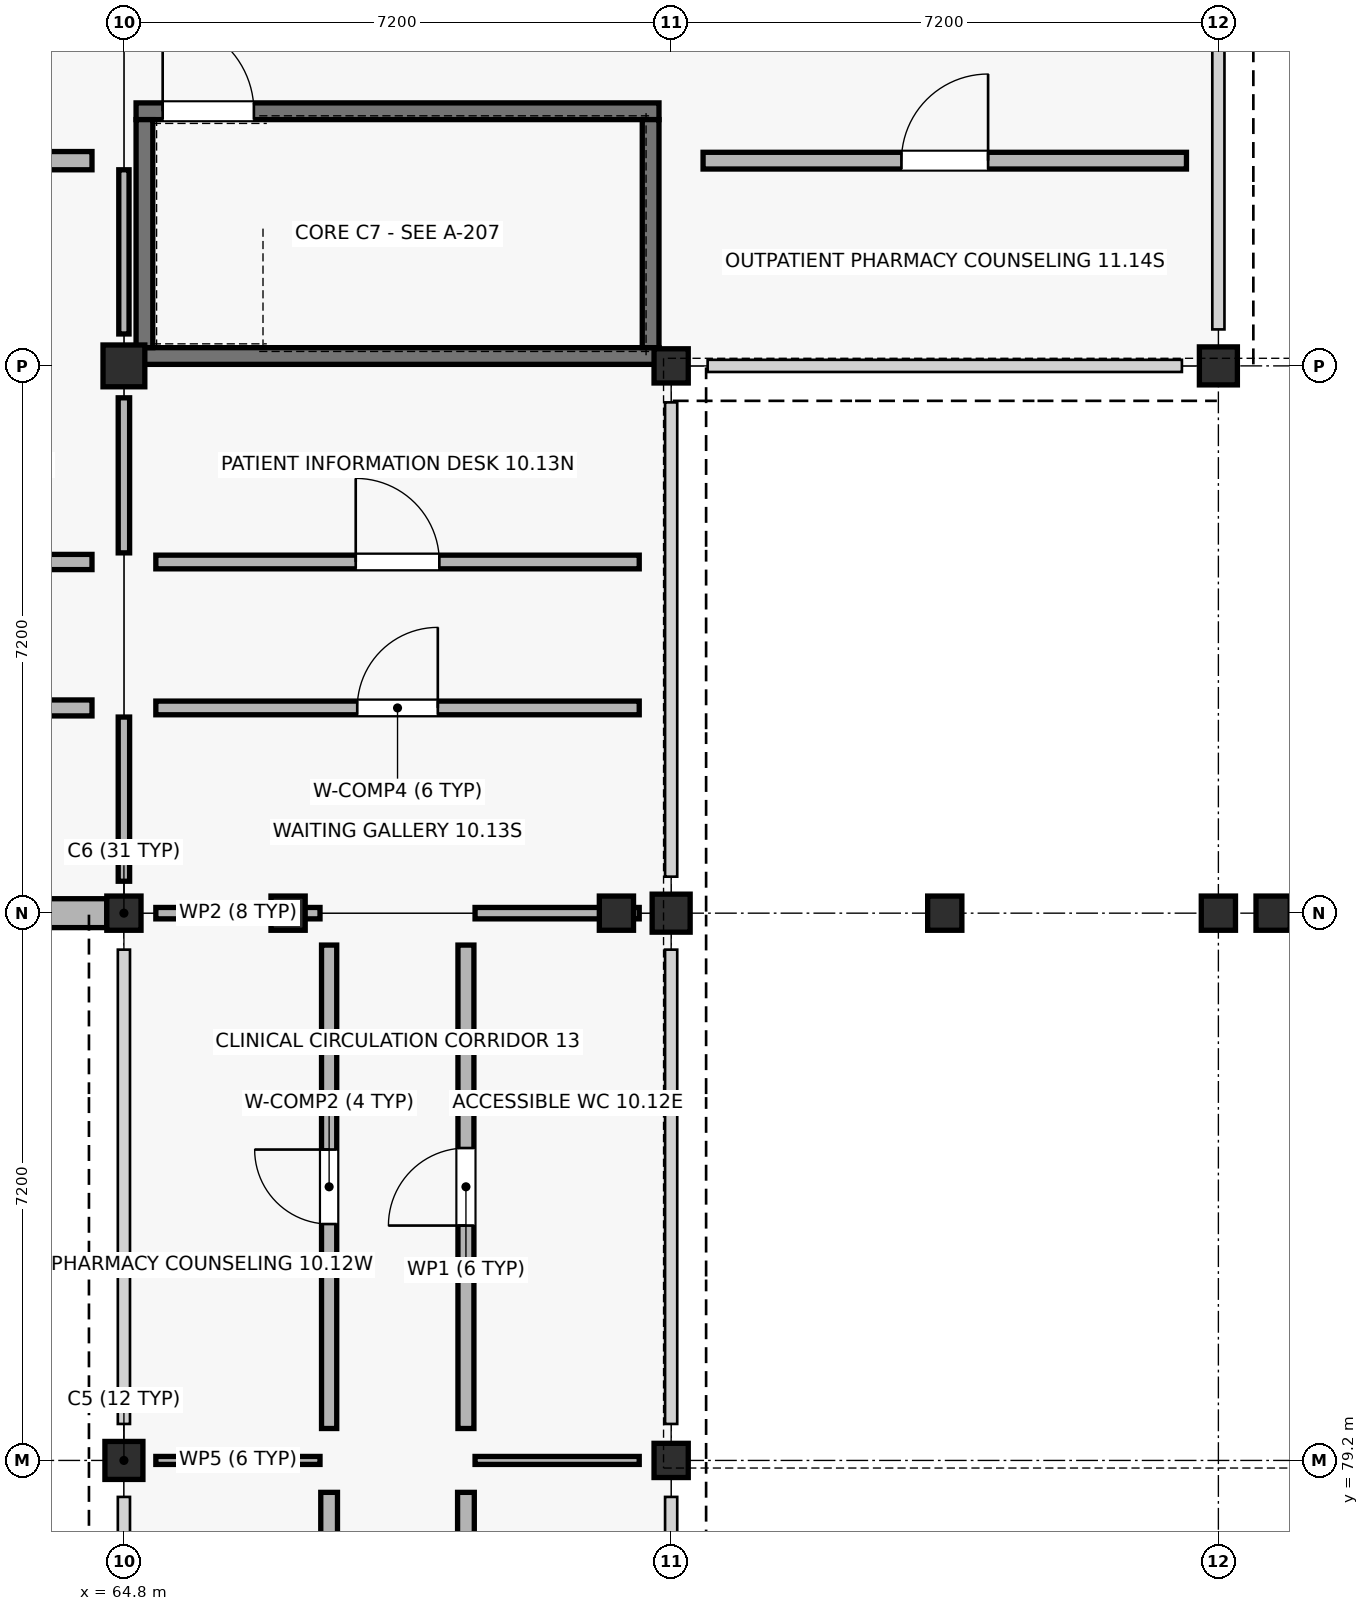
"""IFC4 building model, lengths in metres.
Left out: names, types, materials, properties, quantities, classifications, styles, units other than length and angle.
Written with IfcOpenShell. Run it as: python <this file> out.ifc"""

import sys

from ifc_helpers import new_model, si_unit, direction, frame, frame_2d, origin, origin_2d, place, context, subcontext, project, spatial, rectangle, extrude, element, fill, save


model = new_model("IFC4")
c1 = context("Model", 3, precision=1e-05, world=origin(), true_north=direction((0.0, 1.0)))
c2 = subcontext(c1, "Body", "Model", "MODEL_VIEW")
j1 = project(units=[si_unit("LENGTHUNIT", "METRE"), si_unit("PLANEANGLEUNIT", "RADIAN")], contexts=[c1])
p1 = place(None, origin())
s1 = spatial("IfcSite", under=j1, at=p1, CompositionType="ELEMENT")
p2 = place(p1, origin())
s2 = spatial("IfcBuilding", under=s1, at=p2, CompositionType="ELEMENT")
p3 = place(p2, frame((0.0, 0.0, 4.5)))
s3 = spatial("IfcBuildingStorey", under=s2, at=p3, CompositionType="ELEMENT", Elevation=4.5)
p4 = place(p3, frame((64.8, 79.2, 0.0), z_axis=(0.0, 0.0, 1.0), x_axis=(1.0, 0.0, 0.0)))
e1 = element("IfcColumn", 1, at=p4, inside=s3, PredefinedType="COLUMN", context=c2, shape_type="SweptSolid", body=[
    extrude(rectangle(XDim=0.5, YDim=0.5, at=origin_2d()), origin(), (0.0, 0.0, 1.0), 4.28),
])
p5 = place(p3, frame((64.8, 86.4, 0.0), z_axis=(0.0, 0.0, 1.0), x_axis=(1.0, 0.0, 0.0)))
e2 = element("IfcColumn", 2, at=p5, inside=s3, PredefinedType="COLUMN", context=c2, shape_type="SweptSolid", body=[
    extrude(rectangle(XDim=0.45, YDim=0.45, at=origin_2d()), origin(), (0.0, 0.0, 1.0), 12.72),
])
p6 = place(p3, frame((64.8, 93.6, 0.0), z_axis=(0.0, 0.0, 1.0), x_axis=(1.0, 0.0, 0.0)))
e3 = element("IfcColumn", 3, at=p6, inside=s3, PredefinedType="COLUMN", context=c2, shape_type="SweptSolid", body=[
    extrude(rectangle(XDim=0.55, YDim=0.55, at=origin_2d()), origin(), (0.0, 0.0, 1.0), 4.5),
])
p7 = place(p3, frame((72.0, 79.2, 0.0), z_axis=(0.0, 0.0, 1.0), x_axis=(1.0, 0.0, 0.0)))
e4 = element("IfcColumn", 4, at=p7, inside=s3, PredefinedType="COLUMN", context=c2, shape_type="SweptSolid", body=[
    extrude(rectangle(XDim=0.45, YDim=0.45, at=origin_2d()), origin(), (0.0, 0.0, 1.0), 4.28),
])
p8 = place(p3, frame((72.0, 86.4, 0.0), z_axis=(0.0, 0.0, 1.0), x_axis=(1.0, 0.0, 0.0)))
e5 = element("IfcColumn", 5, at=p8, inside=s3, PredefinedType="COLUMN", context=c2, shape_type="SweptSolid", body=[
    extrude(rectangle(XDim=0.5, YDim=0.5, at=origin_2d()), origin(), (0.0, 0.0, 1.0), 12.72),
])
p9 = place(p3, frame((72.0, 93.6, 0.0), z_axis=(0.0, 0.0, 1.0), x_axis=(1.0, 0.0, 0.0)))
e6 = element("IfcColumn", 6, at=p9, inside=s3, PredefinedType="COLUMN", context=c2, shape_type="SweptSolid", body=[
    extrude(rectangle(XDim=0.45, YDim=0.45, at=origin_2d()), origin(), (0.0, 0.0, 1.0), 4.28),
])
p10 = place(p3, frame((79.2, 86.4, 0.0), z_axis=(0.0, 0.0, 1.0), x_axis=(1.0, 0.0, 0.0)))
e7 = element("IfcColumn", 7, at=p10, inside=s3, PredefinedType="COLUMN", context=c2, shape_type="SweptSolid", body=[
    extrude(rectangle(XDim=0.45, YDim=0.45, at=origin_2d()), origin(), (0.0, 0.0, 1.0), 12.72),
])
p11 = place(p3, frame((79.2, 93.6, 0.0), z_axis=(0.0, 0.0, 1.0), x_axis=(1.0, 0.0, 0.0)))
e8 = element("IfcColumn", 8, at=p11, inside=s3, PredefinedType="COLUMN", context=c2, shape_type="SweptSolid", body=[
    extrude(rectangle(XDim=0.5, YDim=0.5, at=origin_2d()), origin(), (0.0, 0.0, 1.0), 4.28),
])
for number, where, z_axis, x_axis in (
    (9, (66.96, 86.4, 12.295), (0.0, 0.0, 1.0), (1.0, 0.0, 0.0)),
    (10, (71.28, 86.4, 12.295), (0.0, 0.0, 1.0), (1.0, 0.0, 0.0)),
    (11, (75.6, 86.4, 12.295), (0.0, 0.0, 1.0), (1.0, 0.0, 0.0)),
    (12, (79.92, 86.4, 12.295), (0.0, 0.0, 1.0), (1.0, 0.0, 0.0)),
):
    element("IfcColumn", number, at=place(p3, frame(where, z_axis=z_axis, x_axis=x_axis)), inside=s3, PredefinedType="COLUMN", context=c2, shape_type="SweptSolid", body=[
        extrude(rectangle(XDim=0.45, YDim=0.45, at=origin_2d()), origin(), (0.0, 0.0, 1.0), 3.405),
    ])
p12 = place(p3, frame((57.875, 86.4, 0.0), z_axis=(0.0, 0.0, 1.0), x_axis=(1.0, 0.0, 0.0)))
e13 = element("IfcWall", 13, at=p12, inside=s3, PredefinedType="SOLIDWALL", context=c2, shape_type="SweptSolid", body=[
    extrude(rectangle(XDim=6.7, YDim=0.38, at=frame_2d((3.35, 0.0))), origin(), (0.0, 0.0, 1.0), 3.47),
])
p13 = place(p12, frame((1.15, 0.0, 0.9)))
e14 = element("IfcOpeningElement", 14, at=p13, cuts=e13, PredefinedType="OPENING", context=c2, shape_type="SweptSolid", body=[
    extrude(rectangle(XDim=1.2, YDim=1.62, at=frame_2d((0.6, 0.81))), frame((0.0, 0.2, 0.0), z_axis=(0.0, -1.0, 0.0), x_axis=(1.0, 0.0, 0.0)), (0.0, 0.0, 1.0), 0.4),
])
p14 = place(p12, frame((4.35, 0.0, 0.9)))
e15 = element("IfcOpeningElement", 15, at=p14, cuts=e13, PredefinedType="OPENING", context=c2, shape_type="SweptSolid", body=[
    extrude(rectangle(XDim=1.2, YDim=1.62, at=frame_2d((0.6, 0.81))), frame((0.0, 0.2, 0.0), z_axis=(0.0, -1.0, 0.0), x_axis=(1.0, 0.0, 0.0)), (0.0, 0.0, 1.0), 0.4),
])
p15 = place(p3, frame((64.96, 93.73, 0.0), z_axis=(0.0, 0.0, 1.0), x_axis=(1.0, 0.0, 0.0)))
e16 = element("IfcWall", 16, at=p15, inside=s3, PredefinedType="SHEAR", context=c2, shape_type="SweptSolid", body=[
    extrude(rectangle(XDim=6.88, YDim=0.22, at=frame_2d((3.44, 0.0))), origin(), (0.0, 0.0, 1.0), 4.22),
])
p16 = place(p3, frame((64.96, 96.95, 0.0), z_axis=(0.0, 0.0, 1.0), x_axis=(1.0, 0.0, 0.0)))
e17 = element("IfcWall", 17, at=p16, inside=s3, PredefinedType="SHEAR", context=c2, shape_type="SweptSolid", body=[
    extrude(rectangle(XDim=6.88, YDim=0.22, at=frame_2d((3.44, 0.0))), origin(), (0.0, 0.0, 1.0), 4.22),
])
p17 = place(p16, frame((0.35, 0.0, 0.0)))
e18 = element("IfcOpeningElement", 18, at=p17, cuts=e17, PredefinedType="OPENING", context=c2, shape_type="SweptSolid", body=[
    extrude(rectangle(XDim=1.2, YDim=2.15, at=frame_2d((0.6, 1.075))), frame((0.0, 0.12, 0.0), z_axis=(0.0, -1.0, 0.0), x_axis=(1.0, 0.0, 0.0)), (0.0, 0.0, 1.0), 0.24),
])
for number, where, z_axis, x_axis in (
    (19, (65.07, 93.84, 0.0), (0.0, 0.0, 1.0), (0.0, 1.0, 0.0)),
    (20, (71.73, 93.84, 0.0), (0.0, 0.0, 1.0), (0.0, 1.0, 0.0)),
):
    element("IfcWall", number, at=place(p3, frame(where, z_axis=z_axis, x_axis=x_axis)), inside=s3, PredefinedType="SHEAR", context=c2, shape_type="SweptSolid", body=[
        extrude(rectangle(XDim=3.0, YDim=0.22, at=frame_2d((1.5, 0.0))), origin(), (0.0, 0.0, 1.0), 4.22),
    ])
p18 = place(p3, frame((67.5, 72.42, 0.0), z_axis=(0.0, 0.0, 1.0), x_axis=(0.0, 1.0, 0.0)))
e21 = element("IfcWall", 21, at=p18, inside=s3, PredefinedType="SOLIDWALL", context=c2, shape_type="SweptSolid", body=[
    extrude(rectangle(XDim=6.36, YDim=0.22, at=frame_2d((3.18, 0.0))), origin(), (0.0, 0.0, 1.0), 3.36),
])
p19 = place(p18, frame((2.73, 0.0, 0.0)))
e22 = element("IfcOpeningElement", 22, at=p19, cuts=e21, PredefinedType="OPENING", context=c2, shape_type="SweptSolid", body=[
    extrude(rectangle(XDim=0.9, YDim=2.14, at=frame_2d((0.45, 1.07))), frame((0.0, 0.12, 0.0), z_axis=(0.0, -1.0, 0.0), x_axis=(1.0, 0.0, 0.0)), (0.0, 0.0, 1.0), 0.24),
])
p20 = place(p3, frame((65.22, 79.2, 0.0), z_axis=(0.0, 0.0, 1.0), x_axis=(1.0, 0.0, 0.0)))
e23 = element("IfcWall", 23, at=p20, inside=s3, PredefinedType="PARTITIONING", context=c2, shape_type="SweptSolid", body=[
    extrude(rectangle(XDim=2.16, YDim=0.105, at=frame_2d((1.08, 0.0))), origin(), (0.0, 0.0, 1.0), 3.36),
])
p21 = place(p3, frame((69.3, 72.42, 0.0), z_axis=(0.0, 0.0, 1.0), x_axis=(0.0, 1.0, 0.0)))
e24 = element("IfcWall", 24, at=p21, inside=s3, PredefinedType="SOLIDWALL", context=c2, shape_type="SweptSolid", body=[
    extrude(rectangle(XDim=6.36, YDim=0.22, at=frame_2d((3.18, 0.0))), origin(), (0.0, 0.0, 1.0), 3.36),
])
p22 = place(p21, frame((2.71, 0.0, 0.0)))
e25 = element("IfcOpeningElement", 25, at=p22, cuts=e24, PredefinedType="OPENING", context=c2, shape_type="SweptSolid", body=[
    extrude(rectangle(XDim=0.94, YDim=2.14, at=frame_2d((0.47, 1.07))), frame((0.0, 0.12, 0.0), z_axis=(0.0, -1.0, 0.0), x_axis=(1.0, 0.0, 0.0)), (0.0, 0.0, 1.0), 0.24),
])
p23 = place(p3, frame((69.42, 79.2, 0.0), z_axis=(0.0, 0.0, 1.0), x_axis=(1.0, 0.0, 0.0)))
e26 = element("IfcWall", 26, at=p23, inside=s3, PredefinedType="PARTITIONING", context=c2, shape_type="SweptSolid", body=[
    extrude(rectangle(XDim=2.16, YDim=0.105, at=frame_2d((1.08, 0.0))), origin(), (0.0, 0.0, 1.0), 3.36),
])
p24 = place(p3, frame((67.5, 79.62, 0.0), z_axis=(0.0, 0.0, 1.0), x_axis=(0.0, 1.0, 0.0)))
e27 = element("IfcWall", 27, at=p24, inside=s3, PredefinedType="SOLIDWALL", context=c2, shape_type="SweptSolid", body=[
    extrude(rectangle(XDim=6.36, YDim=0.2, at=frame_2d((3.18, 0.0))), origin(), (0.0, 0.0, 1.0), 3.36),
])
p25 = place(p24, frame((2.69, 0.0, 0.0)))
e28 = element("IfcOpeningElement", 28, at=p25, cuts=e27, PredefinedType="OPENING", context=c2, shape_type="SweptSolid", body=[
    extrude(rectangle(XDim=0.98, YDim=2.14, at=frame_2d((0.49, 1.07))), frame((0.0, 0.11, 0.0), z_axis=(0.0, -1.0, 0.0), x_axis=(1.0, 0.0, 0.0)), (0.0, 0.0, 1.0), 0.22),
])
p26 = place(p3, frame((65.22, 86.4, 0.0), z_axis=(0.0, 0.0, 1.0), x_axis=(1.0, 0.0, 0.0)))
e29 = element("IfcWall", 29, at=p26, inside=s3, PredefinedType="PARTITIONING", context=c2, shape_type="SweptSolid", body=[
    extrude(rectangle(XDim=2.16, YDim=0.15, at=frame_2d((1.08, 0.0))), origin(), (0.0, 0.0, 1.0), 3.36),
])
p27 = place(p3, frame((69.3, 79.62, 0.0), z_axis=(0.0, 0.0, 1.0), x_axis=(0.0, 1.0, 0.0)))
e30 = element("IfcWall", 30, at=p27, inside=s3, PredefinedType="PLUMBINGWALL", context=c2, shape_type="SweptSolid", body=[
    extrude(rectangle(XDim=6.36, YDim=0.21, at=frame_2d((3.18, 0.0))), origin(), (0.0, 0.0, 1.0), 3.36),
])
p28 = place(p27, frame((2.67, 0.0, 0.0)))
e31 = element("IfcOpeningElement", 31, at=p28, cuts=e30, PredefinedType="OPENING", context=c2, shape_type="SweptSolid", body=[
    extrude(rectangle(XDim=1.02, YDim=2.14, at=frame_2d((0.51, 1.07))), frame((0.0, 0.115, 0.0), z_axis=(0.0, -1.0, 0.0), x_axis=(1.0, 0.0, 0.0)), (0.0, 0.0, 1.0), 0.23),
])
p29 = place(p3, frame((69.42, 86.4, 0.0), z_axis=(0.0, 0.0, 1.0), x_axis=(1.0, 0.0, 0.0)))
e32 = element("IfcWall", 32, at=p29, inside=s3, PredefinedType="PARTITIONING", context=c2, shape_type="SweptSolid", body=[
    extrude(rectangle(XDim=2.16, YDim=0.15, at=frame_2d((1.08, 0.0))), origin(), (0.0, 0.0, 1.0), 3.36),
])
p30 = place(p3, frame((65.22, 89.1, 0.0), z_axis=(0.0, 0.0, 1.0), x_axis=(1.0, 0.0, 0.0)))
e33 = element("IfcWall", 33, at=p30, inside=s3, PredefinedType="PARTITIONING", context=c2, shape_type="SweptSolid", body=[
    extrude(rectangle(XDim=6.36, YDim=0.18, at=frame_2d((3.18, 0.0))), origin(), (0.0, 0.0, 1.0), 3.36),
])
p31 = place(p30, frame((2.65, 0.0, 0.0)))
e34 = element("IfcOpeningElement", 34, at=p31, cuts=e33, PredefinedType="OPENING", context=c2, shape_type="SweptSolid", body=[
    extrude(rectangle(XDim=1.06, YDim=2.14, at=frame_2d((0.53, 1.07))), frame((0.0, 0.1, 0.0), z_axis=(0.0, -1.0, 0.0), x_axis=(1.0, 0.0, 0.0)), (0.0, 0.0, 1.0), 0.2),
])
p32 = place(p3, frame((65.22, 91.02, 0.0), z_axis=(0.0, 0.0, 1.0), x_axis=(1.0, 0.0, 0.0)))
e35 = element("IfcWall", 35, at=p32, inside=s3, PredefinedType="PARTITIONING", context=c2, shape_type="SweptSolid", body=[
    extrude(rectangle(XDim=6.36, YDim=0.18, at=frame_2d((3.18, 0.0))), origin(), (0.0, 0.0, 1.0), 3.36),
])
p33 = place(p32, frame((2.63, 0.0, 0.0)))
e36 = element("IfcOpeningElement", 36, at=p33, cuts=e35, PredefinedType="OPENING", context=c2, shape_type="SweptSolid", body=[
    extrude(rectangle(XDim=1.1, YDim=2.14, at=frame_2d((0.55, 1.07))), frame((0.0, 0.1, 0.0), z_axis=(0.0, -1.0, 0.0), x_axis=(1.0, 0.0, 0.0)), (0.0, 0.0, 1.0), 0.2),
])
p34 = place(p3, frame((72.42, 96.3, 0.0), z_axis=(0.0, 0.0, 1.0), x_axis=(1.0, 0.0, 0.0)))
e37 = element("IfcWall", 37, at=p34, inside=s3, PredefinedType="SOLIDWALL", context=c2, shape_type="SweptSolid", body=[
    extrude(rectangle(XDim=6.36, YDim=0.22, at=frame_2d((3.18, 0.0))), origin(), (0.0, 0.0, 1.0), 3.36),
])
p35 = place(p34, frame((2.61, 0.0, 0.0)))
e38 = element("IfcOpeningElement", 38, at=p35, cuts=e37, PredefinedType="OPENING", context=c2, shape_type="SweptSolid", body=[
    extrude(rectangle(XDim=1.14, YDim=2.14, at=frame_2d((0.57, 1.07))), frame((0.0, 0.12, 0.0), z_axis=(0.0, -1.0, 0.0), x_axis=(1.0, 0.0, 0.0)), (0.0, 0.0, 1.0), 0.24),
])
p36 = place(p3, frame((58.02, 89.1, 0.0), z_axis=(0.0, 0.0, 1.0), x_axis=(1.0, 0.0, 0.0)))
e39 = element("IfcWall", 39, at=p36, inside=s3, PredefinedType="PLUMBINGWALL", context=c2, shape_type="SweptSolid", body=[
    extrude(rectangle(XDim=6.36, YDim=0.21, at=frame_2d((3.18, 0.0))), origin(), (0.0, 0.0, 1.0), 3.36),
])
p37 = place(p36, frame((2.51, 0.0, 0.0)))
e40 = element("IfcOpeningElement", 40, at=p37, cuts=e39, PredefinedType="OPENING", context=c2, shape_type="SweptSolid", body=[
    extrude(rectangle(XDim=1.34, YDim=2.04, at=frame_2d((0.67, 1.02))), frame((0.0, 0.115, 0.0), z_axis=(0.0, -1.0, 0.0), x_axis=(1.0, 0.0, 0.0)), (0.0, 0.0, 1.0), 0.23),
])
p38 = place(p3, frame((64.8, 86.82, 0.0), z_axis=(0.0, 0.0, 1.0), x_axis=(0.0, 1.0, 0.0)))
e41 = element("IfcWall", 41, at=p38, inside=s3, PredefinedType="PARTITIONING", context=c2, shape_type="SweptSolid", body=[
    extrude(rectangle(XDim=2.16, YDim=0.15, at=frame_2d((1.08, 0.0))), origin(), (0.0, 0.0, 1.0), 3.36),
])
p39 = place(p3, frame((58.02, 91.02, 0.0), z_axis=(0.0, 0.0, 1.0), x_axis=(1.0, 0.0, 0.0)))
e42 = element("IfcWall", 42, at=p39, inside=s3, PredefinedType="SOLIDWALL", context=c2, shape_type="SweptSolid", body=[
    extrude(rectangle(XDim=6.36, YDim=0.2, at=frame_2d((3.18, 0.0))), origin(), (0.0, 0.0, 1.0), 3.36),
])
p40 = place(p39, frame((2.49, 0.0, 0.0)))
e43 = element("IfcOpeningElement", 43, at=p40, cuts=e42, PredefinedType="OPENING", context=c2, shape_type="SweptSolid", body=[
    extrude(rectangle(XDim=1.38, YDim=2.04, at=frame_2d((0.69, 1.02))), frame((0.0, 0.11, 0.0), z_axis=(0.0, -1.0, 0.0), x_axis=(1.0, 0.0, 0.0)), (0.0, 0.0, 1.0), 0.22),
])
p41 = place(p3, frame((64.8, 91.14, 0.0), z_axis=(0.0, 0.0, 1.0), x_axis=(0.0, 1.0, 0.0)))
e44 = element("IfcWall", 44, at=p41, inside=s3, PredefinedType="PARTITIONING", context=c2, shape_type="SweptSolid", body=[
    extrude(rectangle(XDim=2.04, YDim=0.15, at=frame_2d((1.02, 0.0))), origin(), (0.0, 0.0, 1.0), 3.36),
])
p42 = place(p3, frame((58.02, 96.3, 0.0), z_axis=(0.0, 0.0, 1.0), x_axis=(1.0, 0.0, 0.0)))
e45 = element("IfcWall", 45, at=p42, inside=s3, PredefinedType="SOLIDWALL", context=c2, shape_type="SweptSolid", body=[
    extrude(rectangle(XDim=6.36, YDim=0.24, at=frame_2d((3.18, 0.0))), origin(), (0.0, 0.0, 1.0), 3.36),
])
p43 = place(p42, frame((2.53, 0.0, 0.0)))
e46 = element("IfcOpeningElement", 46, at=p43, cuts=e45, PredefinedType="OPENING", context=c2, shape_type="SweptSolid", body=[
    extrude(rectangle(XDim=1.3, YDim=2.15, at=frame_2d((0.65, 1.075))), frame((0.0, 0.13, 0.0), z_axis=(0.0, -1.0, 0.0), x_axis=(1.0, 0.0, 0.0)), (0.0, 0.0, 1.0), 0.26),
])
p44 = place(p3, frame((64.8, 94.02, 0.0), z_axis=(0.0, 0.0, 1.0), x_axis=(0.0, 1.0, 0.0)))
e47 = element("IfcWall", 47, at=p44, inside=s3, PredefinedType="PARTITIONING", context=c2, shape_type="SweptSolid", body=[
    extrude(rectangle(XDim=2.16, YDim=0.135, at=frame_2d((1.08, 0.0))), origin(), (0.0, 0.0, 1.0), 3.36),
])
p45 = place(p17, origin())
e48 = element("IfcDoor", 48, at=p45, inside=s3, OperationType="SINGLE_SWING_LEFT", PredefinedType="DOOR", context=c2, shape_type="SweptSolid", body=[
    extrude(rectangle(XDim=1.2, YDim=2.15, at=frame_2d((0.6, 1.075))), frame((0.0, 0.025, 0.0), z_axis=(0.0, -1.0, 0.0), x_axis=(1.0, 0.0, 0.0)), (0.0, 0.0, 1.0), 0.05),
])
fill(e18, e48)
p46 = place(p25, origin())
e49 = element("IfcDoor", 49, at=p46, inside=s3, OperationType="SINGLE_SWING_RIGHT", PredefinedType="DOOR", context=c2, shape_type="SweptSolid", body=[
    extrude(rectangle(XDim=0.98, YDim=2.14, at=frame_2d((0.49, 1.07))), frame((0.0, 0.025, 0.0), z_axis=(0.0, -1.0, 0.0), x_axis=(1.0, 0.0, 0.0)), (0.0, 0.0, 1.0), 0.05),
])
fill(e28, e49)
p47 = place(p28, origin())
e50 = element("IfcDoor", 50, at=p47, inside=s3, OperationType="SINGLE_SWING_LEFT", PredefinedType="DOOR", context=c2, shape_type="SweptSolid", body=[
    extrude(rectangle(XDim=1.02, YDim=2.14, at=frame_2d((0.51, 1.07))), frame((0.0, 0.025, 0.0), z_axis=(0.0, -1.0, 0.0), x_axis=(1.0, 0.0, 0.0)), (0.0, 0.0, 1.0), 0.05),
])
fill(e31, e50)
p48 = place(p31, origin())
e51 = element("IfcDoor", 51, at=p48, inside=s3, OperationType="SINGLE_SWING_RIGHT", PredefinedType="DOOR", context=c2, shape_type="SweptSolid", body=[
    extrude(rectangle(XDim=1.06, YDim=2.14, at=frame_2d((0.53, 1.07))), frame((0.0, 0.025, 0.0), z_axis=(0.0, -1.0, 0.0), x_axis=(1.0, 0.0, 0.0)), (0.0, 0.0, 1.0), 0.05),
])
fill(e34, e51)
p49 = place(p33, origin())
e52 = element("IfcDoor", 52, at=p49, inside=s3, OperationType="SINGLE_SWING_LEFT", PredefinedType="DOOR", context=c2, shape_type="SweptSolid", body=[
    extrude(rectangle(XDim=1.1, YDim=2.14, at=frame_2d((0.55, 1.07))), frame((0.0, 0.025, 0.0), z_axis=(0.0, -1.0, 0.0), x_axis=(1.0, 0.0, 0.0)), (0.0, 0.0, 1.0), 0.05),
])
fill(e36, e52)
p50 = place(p35, origin())
e53 = element("IfcDoor", 53, at=p50, inside=s3, OperationType="SINGLE_SWING_RIGHT", PredefinedType="DOOR", context=c2, shape_type="SweptSolid", body=[
    extrude(rectangle(XDim=1.14, YDim=2.14, at=frame_2d((0.57, 1.07))), frame((0.0, 0.025, 0.0), z_axis=(0.0, -1.0, 0.0), x_axis=(1.0, 0.0, 0.0)), (0.0, 0.0, 1.0), 0.05),
])
fill(e38, e53)
save(model, sys.argv[1])
